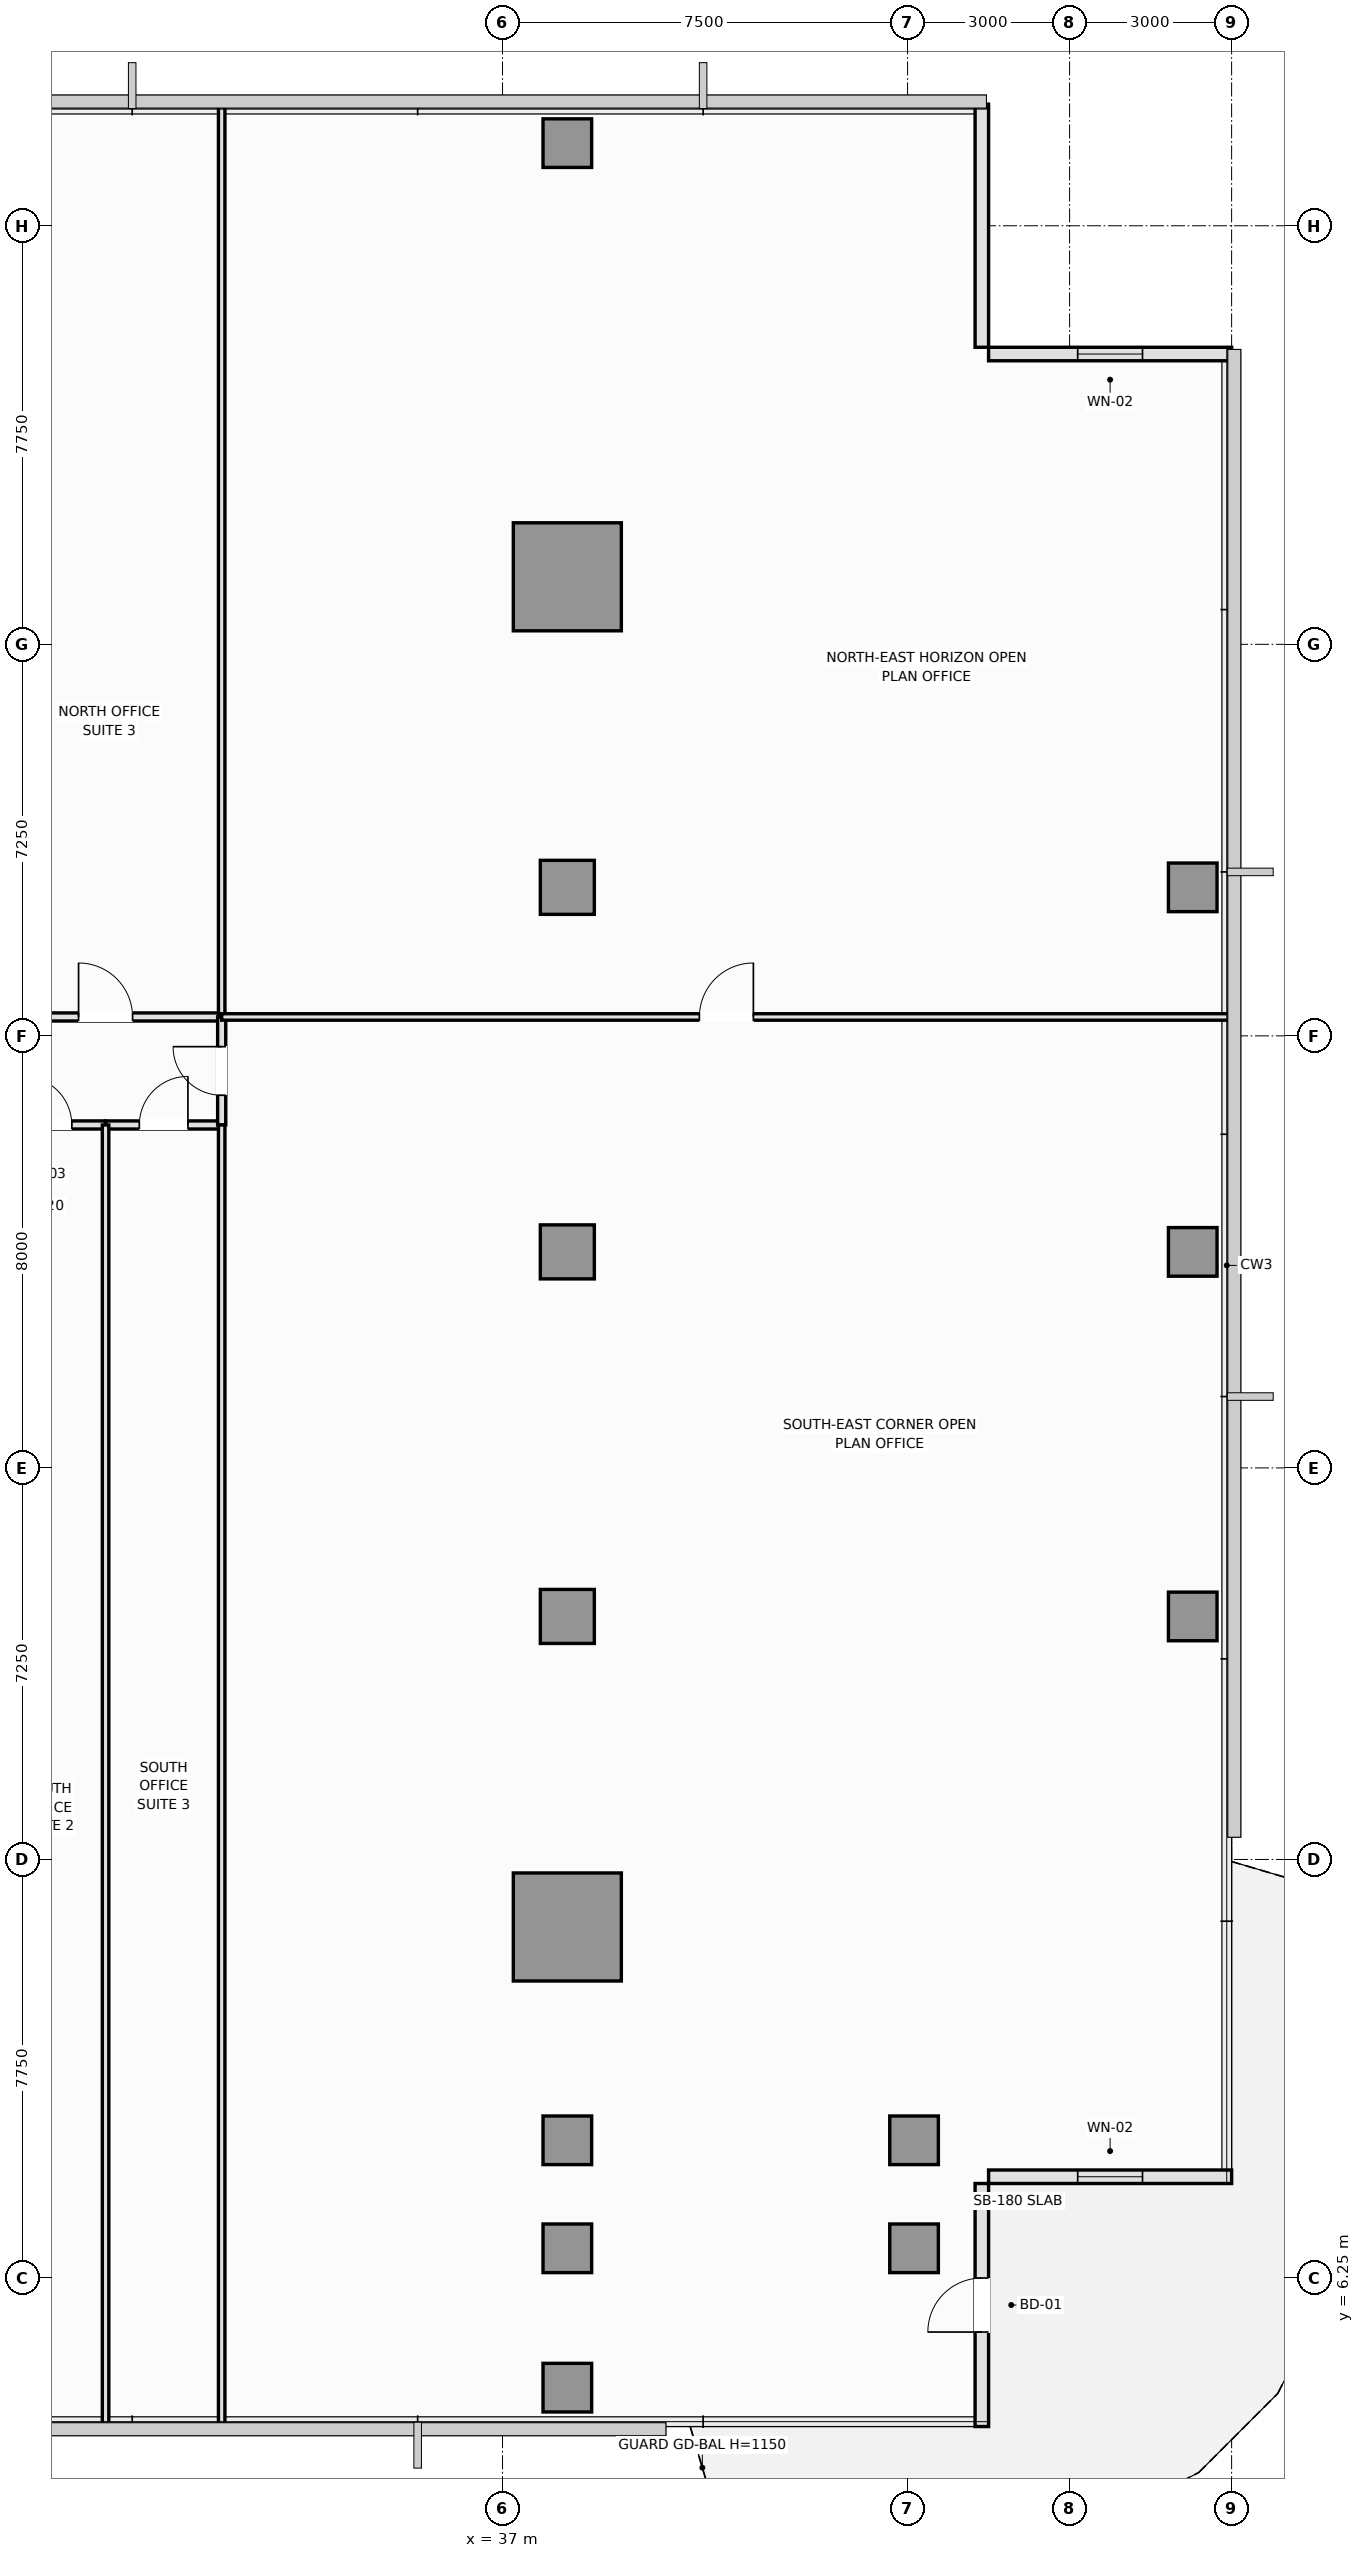
"""IFC4 building model, lengths in metres.
Left out: names, types, materials, properties, quantities, classifications, styles, units other than length and angle.
Written with IfcOpenShell. Run it as: python <this file> out.ifc"""

import sys

from ifc_helpers import new_model, si_unit, direction, frame, frame_2d, origin, origin_2d, place, context, subcontext, project, spatial, rectangle, extrude, element, fill, save


model = new_model("IFC4")
c1 = context("Model", 3, precision=1e-05, world=origin(), true_north=direction((0.0, 1.0)))
c2 = subcontext(c1, "Body", "Model", "MODEL_VIEW")
j1 = project(units=[si_unit("LENGTHUNIT", "METRE"), si_unit("PLANEANGLEUNIT", "RADIAN")], contexts=[c1])
p1 = place(None, origin())
s1 = spatial("IfcSite", under=j1, at=p1, CompositionType="ELEMENT")
p2 = place(p1, origin())
s2 = spatial("IfcBuilding", under=s1, at=p2, CompositionType="ELEMENT")
p3 = place(p2, frame((0.0, 0.0, 159.05)))
s3 = spatial("IfcBuildingStorey", under=s2, at=p3, CompositionType="ELEMENT", Elevation=159.05)
for number, where, z_axis, x_axis in (
    (1, (38.2, 12.75, 0.0), (0.0, 0.0, 1.0), (1.0, 0.0, 0.0)),
    (2, (38.2, 37.75, 0.0), (0.0, 0.0, 1.0), (1.0, 0.0, 0.0)),
):
    element("IfcColumn", number, at=place(p3, frame(where, z_axis=z_axis, x_axis=x_axis)), inside=s3, PredefinedType="COLUMN", context=c2, shape_type="SweptSolid", body=[
        extrude(rectangle(XDim=2.0, YDim=2.0, at=origin_2d()), origin(), (0.0, 0.0, 1.0), 3.55),
    ])
for number, where, z_axis, x_axis in (
    (3, (38.2, 18.5, 0.0), (0.0, 0.0, 1.0), (1.0, 0.0, 0.0)),
    (4, (38.2, 25.25, 0.0), (0.0, 0.0, 1.0), (1.0, 0.0, 0.0)),
    (5, (38.2, 32.0, 0.0), (0.0, 0.0, 1.0), (1.0, 0.0, 0.0)),
):
    element("IfcColumn", number, at=place(p3, frame(where, z_axis=z_axis, x_axis=x_axis)), inside=s3, PredefinedType="COLUMN", context=c2, shape_type="SweptSolid", body=[
        extrude(rectangle(XDim=1.0, YDim=1.0, at=origin_2d()), origin(), (0.0, 0.0, 1.0), 3.55),
    ])
for number, where, z_axis, x_axis in (
    (6, (38.2, 6.8, 0.0), (0.0, 0.0, 1.0), (1.0, 0.0, 0.0)),
    (7, (38.2, 8.8, 0.0), (0.0, 0.0, 1.0), (1.0, 0.0, 0.0)),
    (8, (44.62, 6.8, 0.0), (0.0, 0.0, 1.0), (1.0, 0.0, 0.0)),
    (9, (44.62, 8.8, 0.0), (0.0, 0.0, 1.0), (1.0, 0.0, 0.0)),
    (10, (49.78, 18.5, 0.0), (0.0, 0.0, 1.0), (1.0, 0.0, 0.0)),
    (11, (49.78, 25.25, 0.0), (0.0, 0.0, 1.0), (1.0, 0.0, 0.0)),
    (12, (49.78, 32.0, 0.0), (0.0, 0.0, 1.0), (1.0, 0.0, 0.0)),
    (13, (38.2, 4.22, 0.0), (0.0, 0.0, 1.0), (1.0, 0.0, 0.0)),
    (14, (38.2, 45.78, 0.0), (0.0, 0.0, 1.0), (1.0, 0.0, 0.0)),
):
    element("IfcColumn", number, at=place(p3, frame(where, z_axis=z_axis, x_axis=x_axis)), inside=s3, PredefinedType="COLUMN", context=c2, shape_type="SweptSolid", body=[
        extrude(rectangle(XDim=0.9, YDim=0.9, at=origin_2d()), origin(), (0.0, 0.0, 1.0), 3.55),
    ])
p4 = place(p3, frame((45.875, 3.5, 0.0), z_axis=(0.0, 0.0, 1.0), x_axis=(0.0, 1.0, 0.0)))
e15 = element("IfcWall", 15, at=p4, inside=s3, PredefinedType="SOLIDWALL", context=c2, shape_type="SweptSolid", body=[
    extrude(rectangle(XDim=4.5, YDim=0.25, at=frame_2d((2.25, 0.0))), origin(), (0.0, 0.0, 1.0), 3.07),
])
p5 = place(p4, frame((1.75, 0.0, 0.0)))
e16 = element("IfcOpeningElement", 16, at=p5, cuts=e15, PredefinedType="OPENING", context=c2, shape_type="SweptSolid", body=[
    extrude(rectangle(XDim=1.0, YDim=2.2, at=frame_2d((0.5, 1.1))), frame((0.0, 0.135, 0.0), z_axis=(0.0, -1.0, 0.0), x_axis=(1.0, 0.0, 0.0)), (0.0, 0.0, 1.0), 0.27),
])
p6 = place(p3, frame((46.0, 8.125, 0.0), z_axis=(0.0, 0.0, 1.0), x_axis=(1.0, 0.0, 0.0)))
e17 = element("IfcWall", 17, at=p6, inside=s3, PredefinedType="SOLIDWALL", context=c2, shape_type="SweptSolid", body=[
    extrude(rectangle(XDim=4.5, YDim=0.25, at=frame_2d((2.25, 0.0))), origin(), (0.0, 0.0, 1.0), 3.1),
])
p7 = place(p6, frame((1.65, 0.0, 0.9)))
e18 = element("IfcOpeningElement", 18, at=p7, cuts=e17, PredefinedType="OPENING", context=c2, shape_type="SweptSolid", body=[
    extrude(rectangle(XDim=1.2, YDim=1.8, at=frame_2d((0.6, 0.9))), frame((0.0, 0.135, 0.0), z_axis=(0.0, -1.0, 0.0), x_axis=(1.0, 0.0, 0.0)), (0.0, 0.0, 1.0), 0.27),
])
p8 = place(p3, frame((50.5, 41.875, 0.0), z_axis=(0.0, 0.0, 1.0), x_axis=(-1.0, 0.0, 0.0)))
e19 = element("IfcWall", 19, at=p8, inside=s3, PredefinedType="SOLIDWALL", context=c2, shape_type="SweptSolid", body=[
    extrude(rectangle(XDim=4.5, YDim=0.25, at=frame_2d((2.25, 0.0))), origin(), (0.0, 0.0, 1.0), 3.37),
])
p9 = place(p8, frame((1.65, 0.0, 0.9)))
e20 = element("IfcOpeningElement", 20, at=p9, cuts=e19, PredefinedType="OPENING", context=c2, shape_type="SweptSolid", body=[
    extrude(rectangle(XDim=1.2, YDim=1.8, at=frame_2d((0.6, 0.9))), frame((0.0, 0.135, 0.0), z_axis=(0.0, -1.0, 0.0), x_axis=(1.0, 0.0, 0.0)), (0.0, 0.0, 1.0), 0.27),
])
p10 = place(p3, frame((45.875, 42.0, 0.0), z_axis=(0.0, 0.0, 1.0), x_axis=(0.0, 1.0, 0.0)))
e21 = element("IfcWall", 21, at=p10, inside=s3, PredefinedType="SOLIDWALL", context=c2, shape_type="SweptSolid", body=[
    extrude(rectangle(XDim=4.5, YDim=0.25, at=frame_2d((2.25, 0.0))), origin(), (0.0, 0.0, 1.0), 3.37),
])
p11 = place(p3, frame((27.5, 27.6, 0.0), z_axis=(0.0, 0.0, 1.0), x_axis=(1.0, 0.0, 0.0)))
e22 = element("IfcWall", 22, at=p11, inside=s3, PredefinedType="PARTITIONING", context=c2, shape_type="SweptSolid", body=[
    extrude(rectangle(XDim=2.15, YDim=0.15, at=frame_2d((1.075, 0.0))), origin(), (0.0, 0.0, 1.0), 3.37),
])
p12 = place(p11, frame((0.625, 0.0, 0.0)))
e23 = element("IfcOpeningElement", 23, at=p12, cuts=e22, PredefinedType="OPENING", context=c2, shape_type="SweptSolid", body=[
    extrude(rectangle(XDim=0.9, YDim=2.1, at=frame_2d((0.45, 1.05))), frame((0.0, 0.085, 0.0), z_axis=(0.0, -1.0, 0.0), x_axis=(1.0, 0.0, 0.0)), (0.0, 0.0, 1.0), 0.17),
])
p13 = place(p3, frame((29.65, 27.6, 0.0), z_axis=(0.0, 0.0, 1.0), x_axis=(1.0, 0.0, 0.0)))
e24 = element("IfcWall", 24, at=p13, inside=s3, PredefinedType="PARTITIONING", context=c2, shape_type="SweptSolid", body=[
    extrude(rectangle(XDim=2.15, YDim=0.15, at=frame_2d((1.075, 0.0))), origin(), (0.0, 0.0, 1.0), 3.37),
])
p14 = place(p13, frame((0.625, 0.0, 0.0)))
e25 = element("IfcOpeningElement", 25, at=p14, cuts=e24, PredefinedType="OPENING", context=c2, shape_type="SweptSolid", body=[
    extrude(rectangle(XDim=0.9, YDim=2.1, at=frame_2d((0.45, 1.05))), frame((0.0, 0.085, 0.0), z_axis=(0.0, -1.0, 0.0), x_axis=(1.0, 0.0, 0.0)), (0.0, 0.0, 1.0), 0.17),
])
p15 = place(p3, frame((27.5, 29.6, 0.0), z_axis=(0.0, 0.0, 1.0), x_axis=(1.0, 0.0, 0.0)))
e26 = element("IfcWall", 26, at=p15, inside=s3, PredefinedType="PARTITIONING", context=c2, shape_type="SweptSolid", body=[
    extrude(rectangle(XDim=4.3, YDim=0.15, at=frame_2d((2.15, 0.0))), origin(), (0.0, 0.0, 1.0), 3.37),
])
p16 = place(p15, frame((1.65, 0.0, 0.0)))
e27 = element("IfcOpeningElement", 27, at=p16, cuts=e26, PredefinedType="OPENING", context=c2, shape_type="SweptSolid", body=[
    extrude(rectangle(XDim=1.0, YDim=2.15, at=frame_2d((0.5, 1.075))), frame((0.0, 0.085, 0.0), z_axis=(0.0, -1.0, 0.0), x_axis=(1.0, 0.0, 0.0)), (0.0, 0.0, 1.0), 0.17),
])
p17 = place(p3, frame((31.8, 27.6, 0.0), z_axis=(0.0, 0.0, 1.0), x_axis=(0.0, 1.0, 0.0)))
e28 = element("IfcWall", 28, at=p17, inside=s3, PredefinedType="PARTITIONING", context=c2, shape_type="SweptSolid", body=[
    extrude(rectangle(XDim=2.0, YDim=0.15, at=frame_2d((1.0, 0.0))), origin(), (0.0, 0.0, 1.0), 3.37),
])
p18 = place(p17, frame((0.55, 0.0, 0.0)))
e29 = element("IfcOpeningElement", 29, at=p18, cuts=e28, PredefinedType="OPENING", context=c2, shape_type="SweptSolid", body=[
    extrude(rectangle(XDim=0.9, YDim=2.1, at=frame_2d((0.45, 1.05))), frame((0.0, 0.085, 0.0), z_axis=(0.0, -1.0, 0.0), x_axis=(1.0, 0.0, 0.0)), (0.0, 0.0, 1.0), 0.17),
])
for number, where, z_axis, x_axis in (
    (30, (29.65, 3.51, 0.0), (0.0, 0.0, 1.0), (0.0, 1.0, 0.0)),
    (31, (31.8, 3.51, 0.0), (0.0, 0.0, 1.0), (0.0, 1.0, 0.0)),
):
    element("IfcWall", number, at=place(p3, frame(where, z_axis=z_axis, x_axis=x_axis)), inside=s3, PredefinedType="PARTITIONING", context=c2, shape_type="SweptSolid", body=[
        extrude(rectangle(XDim=24.09, YDim=0.12, at=frame_2d((12.045, 0.0))), origin(), (0.0, 0.0, 1.0), 3.37),
    ])
p19 = place(p3, frame((31.8, 29.6, 0.0), z_axis=(0.0, 0.0, 1.0), x_axis=(0.0, 1.0, 0.0)))
e32 = element("IfcWall", 32, at=p19, inside=s3, PredefinedType="PARTITIONING", context=c2, shape_type="SweptSolid", body=[
    extrude(rectangle(XDim=16.89, YDim=0.12, at=frame_2d((8.445, 0.0))), origin(), (0.0, 0.0, 1.0), 3.37),
])
p20 = place(p3, frame((31.8, 29.6, 0.0), z_axis=(0.0, 0.0, 1.0), x_axis=(1.0, 0.0, 0.0)))
e33 = element("IfcWall", 33, at=p20, inside=s3, PredefinedType="PARTITIONING", context=c2, shape_type="SweptSolid", body=[
    extrude(rectangle(XDim=18.69, YDim=0.12, at=frame_2d((9.345, 0.0))), origin(), (0.0, 0.0, 1.0), 3.37),
])
p21 = place(p20, frame((8.845, 0.0, 0.0)))
e34 = element("IfcOpeningElement", 34, at=p21, cuts=e33, PredefinedType="OPENING", context=c2, shape_type="SweptSolid", body=[
    extrude(rectangle(XDim=1.0, YDim=2.15, at=frame_2d((0.5, 1.075))), frame((0.0, 0.07, 0.0), z_axis=(0.0, -1.0, 0.0), x_axis=(1.0, 0.0, 0.0)), (0.0, 0.0, 1.0), 0.14),
])
p22 = place(p5, frame((1.0, 0.0, 0.0), z_axis=(0.0, 0.0, 1.0), x_axis=(-1.0, 0.0, 0.0)))
e35 = element("IfcDoor", 35, at=p22, inside=s3, OperationType="SINGLE_SWING_LEFT", PredefinedType="DOOR", context=c2, shape_type="SweptSolid", body=[
    extrude(rectangle(XDim=1.0, YDim=2.2, at=frame_2d((0.5, 1.1))), frame((0.0, 0.025, 0.0), z_axis=(0.0, -1.0, 0.0), x_axis=(1.0, 0.0, 0.0)), (0.0, 0.0, 1.0), 0.05),
])
fill(e16, e35)
p23 = place(p7, origin())
e36 = element("IfcWindow", 36, at=p23, inside=s3, PartitioningType="SINGLE_PANEL", PredefinedType="WINDOW", context=c2, shape_type="SweptSolid", body=[
    extrude(rectangle(XDim=1.2, YDim=1.8, at=frame_2d((0.6, 0.9))), frame((0.0, 0.03, 0.0), z_axis=(0.0, -1.0, 0.0), x_axis=(1.0, 0.0, 0.0)), (0.0, 0.0, 1.0), 0.06),
])
fill(e18, e36)
p24 = place(p9, origin())
e37 = element("IfcWindow", 37, at=p24, inside=s3, PartitioningType="SINGLE_PANEL", PredefinedType="WINDOW", context=c2, shape_type="SweptSolid", body=[
    extrude(rectangle(XDim=1.2, YDim=1.8, at=frame_2d((0.6, 0.9))), frame((0.0, 0.03, 0.0), z_axis=(0.0, -1.0, 0.0), x_axis=(1.0, 0.0, 0.0)), (0.0, 0.0, 1.0), 0.06),
])
fill(e20, e37)
p25 = place(p12, origin())
e38 = element("IfcDoor", 38, at=p25, inside=s3, OperationType="SINGLE_SWING_LEFT", PredefinedType="DOOR", context=c2, shape_type="SweptSolid", body=[
    extrude(rectangle(XDim=0.9, YDim=2.1, at=frame_2d((0.45, 1.05))), frame((0.0, 0.025, 0.0), z_axis=(0.0, -1.0, 0.0), x_axis=(1.0, 0.0, 0.0)), (0.0, 0.0, 1.0), 0.05),
])
fill(e23, e38)
p26 = place(p14, origin())
e39 = element("IfcDoor", 39, at=p26, inside=s3, OperationType="SINGLE_SWING_RIGHT", PredefinedType="DOOR", context=c2, shape_type="SweptSolid", body=[
    extrude(rectangle(XDim=0.9, YDim=2.1, at=frame_2d((0.45, 1.05))), frame((0.0, 0.025, 0.0), z_axis=(0.0, -1.0, 0.0), x_axis=(1.0, 0.0, 0.0)), (0.0, 0.0, 1.0), 0.05),
])
fill(e25, e39)
p27 = place(p16, origin())
e40 = element("IfcDoor", 40, at=p27, inside=s3, OperationType="SINGLE_SWING_LEFT", PredefinedType="DOOR", context=c2, shape_type="SweptSolid", body=[
    extrude(rectangle(XDim=1.0, YDim=2.15, at=frame_2d((0.5, 1.075))), frame((0.0, 0.025, 0.0), z_axis=(0.0, -1.0, 0.0), x_axis=(1.0, 0.0, 0.0)), (0.0, 0.0, 1.0), 0.05),
])
fill(e27, e40)
p28 = place(p18, origin())
e41 = element("IfcDoor", 41, at=p28, inside=s3, OperationType="SINGLE_SWING_RIGHT", PredefinedType="DOOR", context=c2, shape_type="SweptSolid", body=[
    extrude(rectangle(XDim=0.9, YDim=2.1, at=frame_2d((0.45, 1.05))), frame((0.0, 0.025, 0.0), z_axis=(0.0, -1.0, 0.0), x_axis=(1.0, 0.0, 0.0)), (0.0, 0.0, 1.0), 0.05),
])
fill(e29, e41)
p29 = place(p21, origin())
e42 = element("IfcDoor", 42, at=p29, inside=s3, OperationType="SINGLE_SWING_RIGHT", PredefinedType="DOOR", context=c2, shape_type="SweptSolid", body=[
    extrude(rectangle(XDim=1.0, YDim=2.15, at=frame_2d((0.5, 1.075))), frame((0.0, 0.025, 0.0), z_axis=(0.0, -1.0, 0.0), x_axis=(1.0, 0.0, 0.0)), (0.0, 0.0, 1.0), 0.05),
])
fill(e34, e42)
save(model, sys.argv[1])
